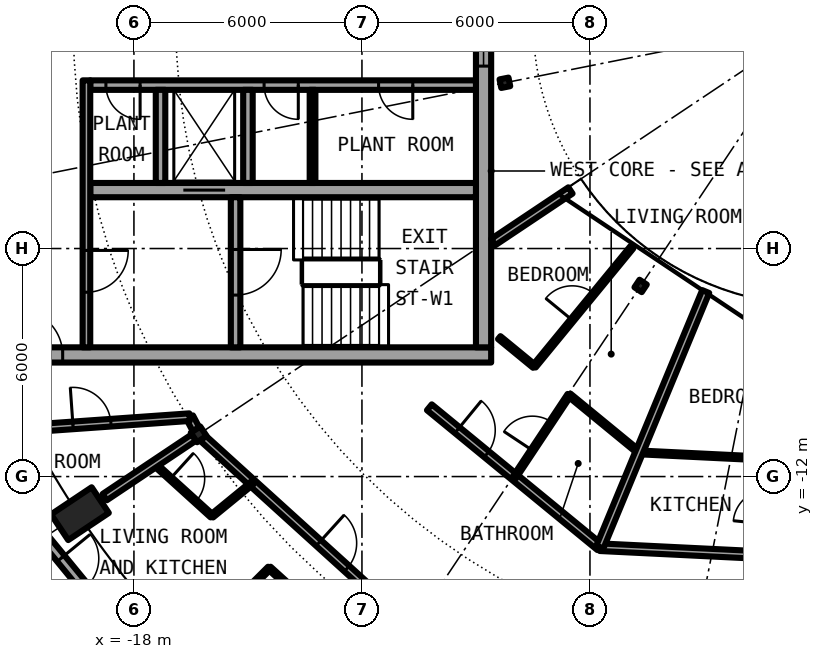
"""IFC4 building model, lengths in metres.
Left out: names, types, materials, properties, quantities, classifications, styles, units other than length and angle.
Written with IfcOpenShell. Run it as: python <this file> out.ifc"""

import sys

from ifc_helpers import new_model, si_unit, direction, frame, frame_2d, origin, origin_2d, place, context, subcontext, project, spatial, rectangle, hollow_circle, i_section, extrude, element, fill, save


model = new_model("IFC4")
c1 = context("Model", 3, precision=1e-05, world=origin(), true_north=direction((0.0, 1.0)))
c2 = subcontext(c1, "Body", "Model", "MODEL_VIEW")
j1 = project(units=[si_unit("LENGTHUNIT", "METRE"), si_unit("PLANEANGLEUNIT", "RADIAN")], contexts=[c1])
p1 = place(None, origin())
s1 = spatial("IfcSite", under=j1, at=p1, CompositionType="ELEMENT")
p2 = place(p1, origin())
s2 = spatial("IfcBuilding", under=s1, at=p2, CompositionType="ELEMENT")
p3 = place(p2, frame((0.0, 0.0, 246.25)))
s3 = spatial("IfcBuildingStorey", under=s2, at=p3, CompositionType="ELEMENT", Elevation=246.25)
p4 = place(p3, frame((-19.955, -13.334, 0.0), z_axis=(0.346819263352, 0.231767499499, 0.908845545043), x_axis=(-0.555620411262, 0.831436082083, 0.0)))
e1 = element("IfcColumn", 1, at=p4, inside=s3, PredefinedType="COLUMN", context=c2, shape_type="SweptSolid", body=[
    extrude(hollow_circle(Radius=0.406, WallThickness=0.03, at=origin_2d()), origin(), (0.0, 0.0, 1.0), 3.081),
])
p5 = place(p3, frame((-16.297, -10.889, 0.0), z_axis=(0.0, 0.0, 1.0), x_axis=(-0.831469612303, -0.55557023302, 0.0)))
e2 = element("IfcColumn", 2, at=p5, inside=s3, PredefinedType="COLUMN", context=c2, shape_type="SweptSolid", body=[
    extrude(i_section(OverallWidth=0.3, OverallDepth=0.3, WebThickness=0.011, FlangeThickness=0.019, FilletRadius=0.027, at=origin_2d()), origin(), (0.0, 0.0, 1.0), 3.05),
])
for number, where, z_axis, x_axis in (
    (3, (-8.239, -1.639, 0.0), (0.0, 0.0, 1.0), (-0.981, -0.195, 0.0)),
    (4, (-4.667, -6.984, 0.0), (0.0, 0.0, 1.0), (-0.556, -0.831, 0.0)),
):
    element("IfcColumn", number, at=place(p3, frame(where, z_axis=z_axis, x_axis=x_axis)), inside=s3, PredefinedType="COLUMN", context=c2, shape_type="SweptSolid", body=[
        extrude(i_section(OverallWidth=0.24, OverallDepth=0.23, WebThickness=0.008, FlangeThickness=0.012, FilletRadius=0.021, at=origin_2d()), origin(), (0.0, 0.0, 1.0), 3.05),
    ])
p6 = place(p3, frame((-20.371, -13.611, 0.0), z_axis=(0.0, 0.0, 1.0), x_axis=(0.634396836208, -0.773007538262, 0.0)))
e5 = element("IfcWall", 5, at=p6, inside=s3, PredefinedType="SOLIDWALL", context=c2, shape_type="SweptSolid", body=[
    extrude(rectangle(XDim=4.803, YDim=0.25, at=frame_2d((2.402, 0.0))), origin(), (0.0, 0.0, 1.0), 2.7),
])
p7 = place(p6, frame((0.704, 0.0, 0.0)))
e6 = element("IfcOpeningElement", 6, at=p7, cuts=e5, PredefinedType="OPENING", context=c2, shape_type="SweptSolid", body=[
    extrude(rectangle(XDim=1.0, YDim=2.2, at=frame_2d((0.5, 1.1))), frame((0.0, 0.135, 0.0), z_axis=(0.0, -1.0, 0.0), x_axis=(1.0, 0.0, 0.0)), (0.0, 0.0, 1.0), 0.27),
])
p8 = place(p6, frame((2.699, 0.0, 0.3)))
e7 = element("IfcOpeningElement", 7, at=p8, cuts=e5, PredefinedType="OPENING", context=c2, shape_type="SweptSolid", body=[
    extrude(rectangle(XDim=1.8, YDim=2.1, at=frame_2d((0.9, 1.05))), frame((0.0, 0.135, 0.0), z_axis=(0.0, -1.0, 0.0), x_axis=(1.0, 0.0, 0.0)), (0.0, 0.0, 1.0), 0.27),
])
p9 = place(p3, frame((-22.0, -8.8, 0.0), z_axis=(0.0, 0.0, 1.0), x_axis=(1.0, 0.0, 0.0)))
e8 = element("IfcWall", 8, at=p9, inside=s3, PredefinedType="SHEAR", context=c2, shape_type="SweptSolid", body=[
    extrude(rectangle(XDim=13.4, YDim=0.4, at=frame_2d((6.7, 0.0))), origin(), (0.0, 0.0, 1.0), 3.05),
])
p10 = place(p9, frame((0.925, 0.0, 0.0)))
e9 = element("IfcOpeningElement", 9, at=p10, cuts=e8, PredefinedType="OPENING", context=c2, shape_type="SweptSolid", body=[
    extrude(rectangle(XDim=1.2, YDim=2.3, at=frame_2d((0.6, 1.15))), frame((0.0, 0.21, 0.0), z_axis=(0.0, -1.0, 0.0), x_axis=(1.0, 0.0, 0.0)), (0.0, 0.0, 1.0), 0.42),
])
p11 = place(p3, frame((-8.8, 8.6, 0.0), z_axis=(0.0, 0.0, 1.0), x_axis=(0.0, -1.0, 0.0)))
e10 = element("IfcWall", 10, at=p11, inside=s3, PredefinedType="SHEAR", context=c2, shape_type="SweptSolid", body=[
    extrude(rectangle(XDim=17.2, YDim=0.4, at=frame_2d((8.6, 0.0))), origin(), (0.0, 0.0, 1.0), 3.05),
])
p12 = place(p11, frame((7.4, 0.0, 0.1)))
e11 = element("IfcOpeningElement", 11, at=p12, cuts=e10, PredefinedType="OPENING", context=c2, shape_type="SweptSolid", body=[
    extrude(rectangle(XDim=2.4, YDim=2.2, at=frame_2d((1.2, 1.1))), frame((0.0, 0.21, 0.0), z_axis=(0.0, -1.0, 0.0), x_axis=(1.0, 0.0, 0.0)), (0.0, 0.0, 1.0), 0.42),
])
p13 = place(p3, frame((-9.0, -1.7, 0.0), z_axis=(0.0, 0.0, 1.0), x_axis=(-1.0, 0.0, 0.0)))
e12 = element("IfcWall", 12, at=p13, inside=s3, PredefinedType="SHEAR", context=c2, shape_type="SweptSolid", body=[
    extrude(rectangle(XDim=10.15, YDim=0.25, at=frame_2d((5.075, 0.0))), origin(), (0.0, 0.0, 1.0), 3.05),
])
p14 = place(p13, frame((1.663, 0.0, 0.0)))
e13 = element("IfcOpeningElement", 13, at=p14, cuts=e12, PredefinedType="OPENING", context=c2, shape_type="SweptSolid", body=[
    extrude(rectangle(XDim=0.9, YDim=2.3, at=frame_2d((0.45, 1.15))), frame((0.0, 0.135, 0.0), z_axis=(0.0, -1.0, 0.0), x_axis=(1.0, 0.0, 0.0)), (0.0, 0.0, 1.0), 0.27),
])
p15 = place(p13, frame((4.675, 0.0, 0.0)))
e14 = element("IfcOpeningElement", 14, at=p15, cuts=e12, PredefinedType="OPENING", context=c2, shape_type="SweptSolid", body=[
    extrude(rectangle(XDim=0.9, YDim=2.3, at=frame_2d((0.45, 1.15))), frame((0.0, 0.135, 0.0), z_axis=(0.0, -1.0, 0.0), x_axis=(1.0, 0.0, 0.0)), (0.0, 0.0, 1.0), 0.27),
])
p16 = place(p13, frame((8.837, 0.0, 0.0)))
e15 = element("IfcOpeningElement", 15, at=p16, cuts=e12, PredefinedType="OPENING", context=c2, shape_type="SweptSolid", body=[
    extrude(rectangle(XDim=0.9, YDim=2.3, at=frame_2d((0.45, 1.15))), frame((0.0, 0.135, 0.0), z_axis=(0.0, -1.0, 0.0), x_axis=(1.0, 0.0, 0.0)), (0.0, 0.0, 1.0), 0.27),
])
p17 = place(p3, frame((-9.0, -4.462, 0.0), z_axis=(0.0, 0.0, 1.0), x_axis=(-1.0, 0.0, 0.0)))
e16 = element("IfcWall", 16, at=p17, inside=s3, PredefinedType="SHEAR", context=c2, shape_type="SweptSolid", body=[
    extrude(rectangle(XDim=10.15, YDim=0.375, at=frame_2d((5.075, 0.0))), origin(), (0.0, 0.0, 1.0), 3.05),
])
p18 = place(p17, frame((6.6, 0.0, 0.0)))
e17 = element("IfcOpeningElement", 17, at=p18, cuts=e16, PredefinedType="OPENING", context=c2, shape_type="SweptSolid", body=[
    extrude(rectangle(XDim=1.1, YDim=2.3, at=frame_2d((0.55, 1.15))), frame((0.0, 0.198, 0.0), z_axis=(0.0, -1.0, 0.0), x_axis=(1.0, 0.0, 0.0)), (0.0, 0.0, 1.0), 0.395),
])
p19 = place(p3, frame((-15.325, -4.65, 0.0), z_axis=(0.0, 0.0, 1.0), x_axis=(0.0, -1.0, 0.0)))
e18 = element("IfcWall", 18, at=p19, inside=s3, PredefinedType="SHEAR", context=c2, shape_type="SweptSolid", body=[
    extrude(rectangle(XDim=3.95, YDim=0.25, at=frame_2d((1.975, 0.0))), origin(), (0.0, 0.0, 1.0), 3.05),
])
p20 = place(p19, frame((1.375, 0.0, 0.0)))
e19 = element("IfcOpeningElement", 19, at=p20, cuts=e18, PredefinedType="OPENING", context=c2, shape_type="SweptSolid", body=[
    extrude(rectangle(XDim=1.2, YDim=2.3, at=frame_2d((0.6, 1.15))), frame((0.0, 0.135, 0.0), z_axis=(0.0, -1.0, 0.0), x_axis=(1.0, 0.0, 0.0)), (0.0, 0.0, 1.0), 0.27),
])
for number, where, z_axis, x_axis in (
    (20, (-15.0, -1.825, 0.0), (0.0, 0.0, 1.0), (0.0, -1.0, 0.0)),
    (21, (-17.3, -1.825, 0.0), (0.0, 0.0, 1.0), (0.0, -1.0, 0.0)),
):
    element("IfcWall", number, at=place(p3, frame(where, z_axis=z_axis, x_axis=x_axis)), inside=s3, PredefinedType="SOLIDWALL", context=c2, shape_type="SweptSolid", body=[
        extrude(rectangle(XDim=2.45, YDim=0.25, at=frame_2d((1.225, 0.0))), origin(), (0.0, 0.0, 1.0), 2.7),
    ])
p21 = place(p3, frame((-19.25, -1.575, 0.0), z_axis=(0.0, 0.0, 1.0), x_axis=(0.0, -1.0, 0.0)))
e22 = element("IfcWall", 22, at=p21, inside=s3, PredefinedType="SOLIDWALL", context=c2, shape_type="SweptSolid", body=[
    extrude(rectangle(XDim=7.025, YDim=0.2, at=frame_2d((3.513, 0.0))), origin(), (0.0, 0.0, 1.0), 2.7),
])
p22 = place(p21, frame((4.475, 0.0, 0.0)))
e23 = element("IfcOpeningElement", 23, at=p22, cuts=e22, PredefinedType="OPENING", context=c2, shape_type="SweptSolid", body=[
    extrude(rectangle(XDim=1.1, YDim=2.3, at=frame_2d((0.55, 1.15))), frame((0.0, 0.11, 0.0), z_axis=(0.0, -1.0, 0.0), x_axis=(1.0, 0.0, 0.0)), (0.0, 0.0, 1.0), 0.22),
])
p23 = place(p3, frame((-13.3, -1.825, 0.0), z_axis=(0.0, 0.0, 1.0), x_axis=(0.0, -1.0, 0.0)))
e24 = element("IfcWall", 24, at=p23, inside=s3, PredefinedType="PARTITIONING", context=c2, shape_type="SweptSolid", body=[
    extrude(rectangle(XDim=2.45, YDim=0.15, at=frame_2d((1.225, 0.0))), origin(), (0.0, 0.0, 1.0), 2.7),
])
p24 = place(p3, frame((-17.461, -11.667, 0.0), z_axis=(0.0, 0.0, 1.0), x_axis=(0.740773018627, -0.671755412984, 0.0)))
e25 = element("IfcWall", 25, at=p24, inside=s3, PredefinedType="PARTITIONING", context=c2, shape_type="SweptSolid", body=[
    extrude(rectangle(XDim=2.041, YDim=0.1, at=frame_2d((1.021, 0.0))), origin(), (0.0, 0.0, 1.0), 2.7),
])
p25 = place(p24, frame((0.571, 0.0, 0.0)))
e26 = element("IfcOpeningElement", 26, at=p25, cuts=e25, PredefinedType="OPENING", context=c2, shape_type="SweptSolid", body=[
    extrude(rectangle(XDim=0.9, YDim=2.3, at=frame_2d((0.45, 1.15))), frame((0.0, 0.06, 0.0), z_axis=(0.0, -1.0, 0.0), x_axis=(1.0, 0.0, 0.0)), (0.0, 0.0, 1.0), 0.12),
])
p26 = place(p3, frame((-14.437, -14.409, 0.0), z_axis=(0.0, 0.0, 1.0), x_axis=(0.740802780294, -0.671722592078, 0.0)))
e27 = element("IfcWall", 27, at=p26, inside=s3, PredefinedType="PARTITIONING", context=c2, shape_type="SweptSolid", body=[
    extrude(rectangle(XDim=4.082, YDim=0.1, at=frame_2d((2.041, 0.0))), origin(), (0.0, 0.0, 1.0), 2.7),
])
p27 = place(p26, frame((2.612, 0.0, 0.0)))
e28 = element("IfcOpeningElement", 28, at=p27, cuts=e27, PredefinedType="OPENING", context=c2, shape_type="SweptSolid", body=[
    extrude(rectangle(XDim=0.9, YDim=2.3, at=frame_2d((0.45, 1.15))), frame((0.0, 0.06, 0.0), z_axis=(0.0, -1.0, 0.0), x_axis=(1.0, 0.0, 0.0)), (0.0, 0.0, 1.0), 0.12),
])
p28 = place(p3, frame((-16.535, -10.437, 0.0), z_axis=(0.0, 0.0, 1.0), x_axis=(0.465802239822, -0.884888848035, 0.0)))
e29 = element("IfcWall", 29, at=p28, inside=s3, PredefinedType="PARTITIONING", context=c2, shape_type="SweptSolid", body=[
    extrude(rectangle(XDim=0.361, YDim=0.2, at=frame_2d((0.18, 0.0))), origin(), (0.0, 0.0, 1.0), 2.7),
])
p29 = place(p3, frame((-16.182, -10.993, 0.0), z_axis=(0.0, 0.0, 1.0), x_axis=(0.740939653983, -0.671571611339, 0.0)))
e30 = element("IfcWall", 30, at=p29, inside=s3, PredefinedType="PARTITIONING", context=c2, shape_type="SweptSolid", body=[
    extrude(rectangle(XDim=7.465, YDim=0.2, at=frame_2d((3.732, 0.0))), origin(), (0.0, 0.0, 1.0), 2.45),
])
p30 = place(p29, frame((4.107, 0.0, 0.0)))
e31 = element("IfcOpeningElement", 31, at=p30, cuts=e30, PredefinedType="OPENING", context=c2, shape_type="SweptSolid", body=[
    extrude(rectangle(XDim=1.0, YDim=2.3, at=frame_2d((0.5, 1.15))), frame((0.0, 0.11, 0.0), z_axis=(0.0, -1.0, 0.0), x_axis=(1.0, 0.0, 0.0)), (0.0, 0.0, 1.0), 0.22),
])
p31 = place(p3, frame((-10.226, -10.177, 0.0), z_axis=(0.0, 0.0, 1.0), x_axis=(0.773071783484, -0.634318545828, 0.0)))
e32 = element("IfcWall", 32, at=p31, inside=s3, PredefinedType="PARTITIONING", context=c2, shape_type="SweptSolid", body=[
    extrude(rectangle(XDim=5.803, YDim=0.2, at=frame_2d((2.901, 0.0))), origin(), (0.0, 0.0, 1.0), 2.7),
])
p32 = place(p31, frame((0.949, 0.0, 0.0)))
e33 = element("IfcOpeningElement", 33, at=p32, cuts=e32, PredefinedType="OPENING", context=c2, shape_type="SweptSolid", body=[
    extrude(rectangle(XDim=1.0, YDim=2.3, at=frame_2d((0.5, 1.15))), frame((0.0, 0.11, 0.0), z_axis=(0.0, -1.0, 0.0), x_axis=(1.0, 0.0, 0.0)), (0.0, 0.0, 1.0), 0.22),
])
p33 = place(p3, frame((-5.737, -13.859, 0.0), z_axis=(0.0, 0.0, 1.0), x_axis=(0.998799182242, -0.048991770265, 0.0)))
e34 = element("IfcWall", 34, at=p33, inside=s3, PredefinedType="PARTITIONING", context=c2, shape_type="SweptSolid", body=[
    extrude(rectangle(XDim=10.106, YDim=0.2, at=frame_2d((5.053, 0.0))), origin(), (0.0, 0.0, 1.0), 2.7),
])
p34 = place(p33, frame((5.27, 0.0, 0.0)))
e35 = element("IfcOpeningElement", 35, at=p34, cuts=e34, PredefinedType="OPENING", context=c2, shape_type="SweptSolid", body=[
    extrude(rectangle(XDim=1.0, YDim=2.3, at=frame_2d((0.5, 1.15))), frame((0.0, 0.11, 0.0), z_axis=(0.0, -1.0, 0.0), x_axis=(1.0, 0.0, 0.0)), (0.0, 0.0, 1.0), 0.22),
])
p35 = place(p3, frame((-8.387, -8.344, 0.0), z_axis=(0.0, 0.0, 1.0), x_axis=(0.772869802794, -0.634564628646, 0.0)))
e36 = element("IfcWall", 36, at=p35, inside=s3, PredefinedType="PARTITIONING", context=c2, shape_type="SweptSolid", body=[
    extrude(rectangle(XDim=1.192, YDim=0.1, at=frame_2d((0.596, 0.0))), origin(), (0.0, 0.0, 1.0), 2.7),
])
p36 = place(p3, frame((-6.547, -9.854, 0.0), z_axis=(0.0, 0.0, 1.0), x_axis=(0.773033390712, -0.634365333893, 0.0)))
e37 = element("IfcWall", 37, at=p36, inside=s3, PredefinedType="PARTITIONING", context=c2, shape_type="SweptSolid", body=[
    extrude(rectangle(XDim=2.38, YDim=0.1, at=frame_2d((1.19, 0.0))), origin(), (0.0, 0.0, 1.0), 2.7),
])
p37 = place(p3, frame((-4.707, -11.364, 0.0), z_axis=(0.0, 0.0, 1.0), x_axis=(0.998798028825, -0.04901527941, 0.0)))
e38 = element("IfcWall", 38, at=p37, inside=s3, PredefinedType="PARTITIONING", context=c2, shape_type="SweptSolid", body=[
    extrude(rectangle(XDim=3.551, YDim=0.1, at=frame_2d((1.776, 0.0))), origin(), (0.0, 0.0, 1.0), 2.7),
])
p38 = place(p3, frame((-21.675, -10.8, 0.0), z_axis=(0.0, 0.0, 1.0), x_axis=(0.997515141784, 0.070452408845, 0.0)))
e39 = element("IfcWall", 39, at=p38, inside=s3, PredefinedType="PARTITIONING", context=c2, shape_type="SweptSolid", body=[
    extrude(rectangle(XDim=5.153, YDim=0.2, at=frame_2d((2.576, 0.0))), origin(), (0.0, 0.0, 1.0), 2.7),
])
p39 = place(p38, frame((2.076, 0.0, 0.0)))
e40 = element("IfcOpeningElement", 40, at=p39, cuts=e39, PredefinedType="OPENING", context=c2, shape_type="SweptSolid", body=[
    extrude(rectangle(XDim=1.0, YDim=2.3, at=frame_2d((0.5, 1.15))), frame((0.0, 0.11, 0.0), z_axis=(0.0, -1.0, 0.0), x_axis=(1.0, 0.0, 0.0)), (0.0, 0.0, 1.0), 0.22),
])
p40 = place(p3, frame((-6.513, -4.472, 0.0), z_axis=(0.0, 0.0, 1.0), x_axis=(-0.831450132577, -0.555599385382, 0.0)))
e41 = element("IfcWall", 41, at=p40, inside=s3, PredefinedType="PARTITIONING", context=c2, shape_type="SweptSolid", body=[
    extrude(rectangle(XDim=2.443, YDim=0.2, at=frame_2d((1.221, 0.0))), origin(), (0.0, 0.0, 1.0), 2.7),
])
p41 = place(p3, frame((-18.769, -12.541, 0.0), z_axis=(0.0, 0.0, 1.0), x_axis=(0.83131782921, 0.555797325324, 0.0)))
e42 = element("IfcWall", 42, at=p41, inside=s3, PredefinedType="PARTITIONING", context=c2, shape_type="SweptSolid", body=[
    extrude(rectangle(XDim=2.823, YDim=0.2, at=frame_2d((1.412, 0.0))), origin(), (0.0, 0.0, 1.0), 2.7),
])
p42 = place(p3, frame((-17.252, -17.219, 0.0), z_axis=(0.0, 0.0, 1.0), x_axis=(0.707720109647, 0.706492920277, 0.0)))
e43 = element("IfcWall", 43, at=p42, inside=s3, PredefinedType="PARTITIONING", context=c2, shape_type="SweptSolid", body=[
    extrude(rectangle(XDim=3.979, YDim=0.1, at=frame_2d((1.989, 0.0))), origin(), (0.0, 0.0, 1.0), 2.7),
])
p43 = place(p42, frame((1.539, 0.0, 0.0)))
e44 = element("IfcOpeningElement", 44, at=p43, cuts=e43, PredefinedType="OPENING", context=c2, shape_type="SweptSolid", body=[
    extrude(rectangle(XDim=0.9, YDim=2.3, at=frame_2d((0.45, 1.15))), frame((0.0, 0.06, 0.0), z_axis=(0.0, -1.0, 0.0), x_axis=(1.0, 0.0, 0.0)), (0.0, 0.0, 1.0), 0.12),
])
p44 = place(p3, frame((-15.949, -13.038, 0.0), z_axis=(0.0, 0.0, 1.0), x_axis=(0.774099733189, 0.633063664315, 0.0)))
e45 = element("IfcWall", 45, at=p44, inside=s3, PredefinedType="PARTITIONING", context=c2, shape_type="SweptSolid", body=[
    extrude(rectangle(XDim=1.375, YDim=0.1, at=frame_2d((0.687, 0.0))), origin(), (0.0, 0.0, 1.0), 2.7),
])
p45 = place(p3, frame((-7.984, -12.017, 0.0), z_axis=(0.0, 0.0, 1.0), x_axis=(0.553289146762, 0.832989267683, 0.0)))
e46 = element("IfcWall", 46, at=p45, inside=s3, PredefinedType="PARTITIONING", context=c2, shape_type="SweptSolid", body=[
    extrude(rectangle(XDim=2.597, YDim=0.1, at=frame_2d((1.298, 0.0))), origin(), (0.0, 0.0, 1.0), 2.7),
])
p46 = place(p45, frame((0.848, 0.0, 0.0)))
e47 = element("IfcOpeningElement", 47, at=p46, cuts=e46, PredefinedType="OPENING", context=c2, shape_type="SweptSolid", body=[
    extrude(rectangle(XDim=0.9, YDim=2.3, at=frame_2d((0.45, 1.15))), frame((0.0, 0.06, 0.0), z_axis=(0.0, -1.0, 0.0), x_axis=(1.0, 0.0, 0.0)), (0.0, 0.0, 1.0), 0.12),
])
p47 = place(p3, frame((-7.467, -9.099, 0.0), z_axis=(0.0, 0.0, 1.0), x_axis=(0.634313840507, 0.773075644256, 0.0)))
e48 = element("IfcWall", 48, at=p47, inside=s3, PredefinedType="PARTITIONING", context=c2, shape_type="SweptSolid", body=[
    extrude(rectangle(XDim=4.05, YDim=0.1, at=frame_2d((2.025, 0.0))), origin(), (0.0, 0.0, 1.0), 2.7),
])
p48 = place(p47, frame((1.575, 0.0, 0.0)))
e49 = element("IfcOpeningElement", 49, at=p48, cuts=e48, PredefinedType="OPENING", context=c2, shape_type="SweptSolid", body=[
    extrude(rectangle(XDim=0.9, YDim=2.3, at=frame_2d((0.45, 1.15))), frame((0.0, 0.06, 0.0), z_axis=(0.0, -1.0, 0.0), x_axis=(1.0, 0.0, 0.0)), (0.0, 0.0, 1.0), 0.12),
])
p49 = place(p3, frame((-5.74, -13.858, 0.0), z_axis=(0.0, 0.0, 1.0), x_axis=(0.38267858248, 0.923881541385, 0.0)))
e50 = element("IfcWall", 50, at=p49, inside=s3, PredefinedType="PARTITIONING", context=c2, shape_type="SweptSolid", body=[
    extrude(rectangle(XDim=7.28, YDim=0.2, at=frame_2d((3.64, 0.0))), origin(), (0.0, 0.0, 1.0), 2.7),
])
p50 = place(p7, origin())
e51 = element("IfcDoor", 51, at=p50, inside=s3, OperationType="SINGLE_SWING_LEFT", PredefinedType="DOOR", context=c2, shape_type="SweptSolid", body=[
    extrude(rectangle(XDim=1.0, YDim=2.2, at=frame_2d((0.5, 1.1))), frame((0.0, 0.025, 0.0), z_axis=(0.0, -1.0, 0.0), x_axis=(1.0, 0.0, 0.0)), (0.0, 0.0, 1.0), 0.05),
])
fill(e6, e51)
p51 = place(p18, origin())
e52 = element("IfcDoor", 52, at=p51, inside=s3, OperationType="DOUBLE_DOOR_SLIDING", PredefinedType="DOOR", context=c2, shape_type="SweptSolid", body=[
    extrude(rectangle(XDim=1.1, YDim=2.3, at=frame_2d((0.55, 1.15))), frame((0.0, 0.025, 0.0), z_axis=(0.0, -1.0, 0.0), x_axis=(1.0, 0.0, 0.0)), (0.0, 0.0, 1.0), 0.05),
])
fill(e17, e52)
p52 = place(p14, origin())
e53 = element("IfcDoor", 53, at=p52, inside=s3, OperationType="SINGLE_SWING_RIGHT", PredefinedType="DOOR", context=c2, shape_type="SweptSolid", body=[
    extrude(rectangle(XDim=0.9, YDim=2.3, at=frame_2d((0.45, 1.15))), frame((0.0, 0.025, 0.0), z_axis=(0.0, -1.0, 0.0), x_axis=(1.0, 0.0, 0.0)), (0.0, 0.0, 1.0), 0.05),
])
fill(e13, e53)
p53 = place(p15, origin())
e54 = element("IfcDoor", 54, at=p53, inside=s3, OperationType="SINGLE_SWING_LEFT", PredefinedType="DOOR", context=c2, shape_type="SweptSolid", body=[
    extrude(rectangle(XDim=0.9, YDim=2.3, at=frame_2d((0.45, 1.15))), frame((0.0, 0.025, 0.0), z_axis=(0.0, -1.0, 0.0), x_axis=(1.0, 0.0, 0.0)), (0.0, 0.0, 1.0), 0.05),
])
fill(e14, e54)
p54 = place(p16, origin())
e55 = element("IfcDoor", 55, at=p54, inside=s3, OperationType="SINGLE_SWING_LEFT", PredefinedType="DOOR", context=c2, shape_type="SweptSolid", body=[
    extrude(rectangle(XDim=0.9, YDim=2.3, at=frame_2d((0.45, 1.15))), frame((0.0, 0.025, 0.0), z_axis=(0.0, -1.0, 0.0), x_axis=(1.0, 0.0, 0.0)), (0.0, 0.0, 1.0), 0.05),
])
fill(e15, e55)
p55 = place(p20, origin())
e56 = element("IfcDoor", 56, at=p55, inside=s3, OperationType="SINGLE_SWING_LEFT", PredefinedType="DOOR", context=c2, shape_type="SweptSolid", body=[
    extrude(rectangle(XDim=1.2, YDim=2.3, at=frame_2d((0.6, 1.15))), frame((0.0, 0.025, 0.0), z_axis=(0.0, -1.0, 0.0), x_axis=(1.0, 0.0, 0.0)), (0.0, 0.0, 1.0), 0.05),
])
fill(e19, e56)
p56 = place(p22, origin())
e57 = element("IfcDoor", 57, at=p56, inside=s3, OperationType="SINGLE_SWING_LEFT", PredefinedType="DOOR", context=c2, shape_type="SweptSolid", body=[
    extrude(rectangle(XDim=1.1, YDim=2.3, at=frame_2d((0.55, 1.15))), frame((0.0, 0.025, 0.0), z_axis=(0.0, -1.0, 0.0), x_axis=(1.0, 0.0, 0.0)), (0.0, 0.0, 1.0), 0.05),
])
fill(e23, e57)
p57 = place(p10, origin())
e58 = element("IfcDoor", 58, at=p57, inside=s3, OperationType="SINGLE_SWING_RIGHT", PredefinedType="DOOR", context=c2, shape_type="SweptSolid", body=[
    extrude(rectangle(XDim=1.2, YDim=2.3, at=frame_2d((0.6, 1.15))), frame((0.0, 0.025, 0.0), z_axis=(0.0, -1.0, 0.0), x_axis=(1.0, 0.0, 0.0)), (0.0, 0.0, 1.0), 0.05),
])
fill(e9, e58)
p58 = place(p12, origin())
e59 = element("IfcWindow", 59, at=p58, inside=s3, PartitioningType="SINGLE_PANEL", PredefinedType="WINDOW", context=c2, shape_type="SweptSolid", body=[
    extrude(rectangle(XDim=2.4, YDim=2.2, at=frame_2d((1.2, 1.1))), frame((0.0, 0.03, 0.0), z_axis=(0.0, -1.0, 0.0), x_axis=(1.0, 0.0, 0.0)), (0.0, 0.0, 1.0), 0.06),
])
fill(e11, e59)
p59 = place(p30, origin())
e60 = element("IfcDoor", 60, at=p59, inside=s3, OperationType="SINGLE_SWING_RIGHT", PredefinedType="DOOR", context=c2, shape_type="SweptSolid", body=[
    extrude(rectangle(XDim=1.0, YDim=2.3, at=frame_2d((0.5, 1.15))), frame((0.0, 0.025, 0.0), z_axis=(0.0, -1.0, 0.0), x_axis=(1.0, 0.0, 0.0)), (0.0, 0.0, 1.0), 0.05),
])
fill(e31, e60)
p60 = place(p25, origin())
e61 = element("IfcDoor", 61, at=p60, inside=s3, OperationType="SINGLE_SWING_LEFT", PredefinedType="DOOR", context=c2, shape_type="SweptSolid", body=[
    extrude(rectangle(XDim=0.9, YDim=2.3, at=frame_2d((0.45, 1.15))), frame((0.0, 0.025, 0.0), z_axis=(0.0, -1.0, 0.0), x_axis=(1.0, 0.0, 0.0)), (0.0, 0.0, 1.0), 0.05),
])
fill(e26, e61)
p61 = place(p32, origin())
e62 = element("IfcDoor", 62, at=p61, inside=s3, OperationType="SINGLE_SWING_LEFT", PredefinedType="DOOR", context=c2, shape_type="SweptSolid", body=[
    extrude(rectangle(XDim=1.0, YDim=2.3, at=frame_2d((0.5, 1.15))), frame((0.0, 0.025, 0.0), z_axis=(0.0, -1.0, 0.0), x_axis=(1.0, 0.0, 0.0)), (0.0, 0.0, 1.0), 0.05),
])
fill(e33, e62)
p62 = place(p46, origin())
e63 = element("IfcDoor", 63, at=p62, inside=s3, OperationType="SINGLE_SWING_RIGHT", PredefinedType="DOOR", context=c2, shape_type="SweptSolid", body=[
    extrude(rectangle(XDim=0.9, YDim=2.3, at=frame_2d((0.45, 1.15))), frame((0.0, 0.025, 0.0), z_axis=(0.0, -1.0, 0.0), x_axis=(1.0, 0.0, 0.0)), (0.0, 0.0, 1.0), 0.05),
])
fill(e47, e63)
p63 = place(p48, origin())
e64 = element("IfcDoor", 64, at=p63, inside=s3, OperationType="SINGLE_SWING_RIGHT", PredefinedType="DOOR", context=c2, shape_type="SweptSolid", body=[
    extrude(rectangle(XDim=0.9, YDim=2.3, at=frame_2d((0.45, 1.15))), frame((0.0, 0.025, 0.0), z_axis=(0.0, -1.0, 0.0), x_axis=(1.0, 0.0, 0.0)), (0.0, 0.0, 1.0), 0.05),
])
fill(e49, e64)
p64 = place(p39, origin())
e65 = element("IfcDoor", 65, at=p64, inside=s3, OperationType="SINGLE_SWING_RIGHT", PredefinedType="DOOR", context=c2, shape_type="SweptSolid", body=[
    extrude(rectangle(XDim=1.0, YDim=2.3, at=frame_2d((0.5, 1.15))), frame((0.0, 0.025, 0.0), z_axis=(0.0, -1.0, 0.0), x_axis=(1.0, 0.0, 0.0)), (0.0, 0.0, 1.0), 0.05),
])
fill(e40, e65)
save(model, sys.argv[1])
